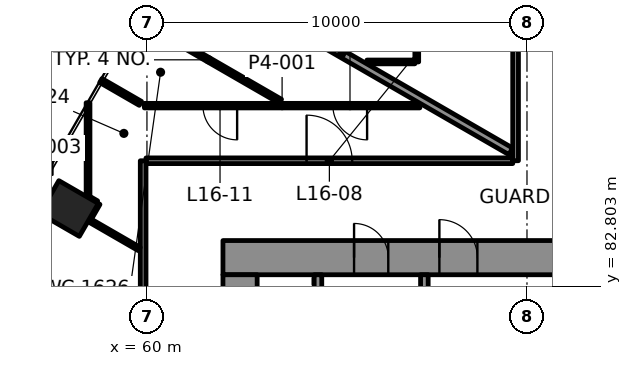
"""IFC4 building model, lengths in metres.
Left out: names, types, materials, properties, quantities, classifications, styles, units other than length and angle.
Written with IfcOpenShell. Run it as: python <this file> out.ifc"""

import sys

from ifc_helpers import new_model, si_unit, direction, frame, frame_2d, origin, origin_2d, place, context, subcontext, project, spatial, rectangle, extrude, element, fill, save


model = new_model("IFC4")
c1 = context("Model", 3, precision=1e-05, world=origin(), true_north=direction((0.0, 1.0)))
c2 = subcontext(c1, "Body", "Model", "MODEL_VIEW")
j1 = project(units=[si_unit("LENGTHUNIT", "METRE"), si_unit("PLANEANGLEUNIT", "RADIAN")], contexts=[c1])
p1 = place(None, origin())
s1 = spatial("IfcSite", under=j1, at=p1, CompositionType="ELEMENT")
p2 = place(p1, origin())
s2 = spatial("IfcBuilding", under=s1, at=p2, CompositionType="ELEMENT")
p3 = place(p2, frame((0.0, 0.0, 73.6)))
s3 = spatial("IfcBuildingStorey", under=s2, at=p3, CompositionType="ELEMENT", Elevation=73.6)
p4 = place(p3, frame((57.951, 84.843, -0.0), z_axis=(0.0, 0.0, 1.0), x_axis=(-0.5, -0.866025403784, 0.0)))
e1 = element("IfcColumn", 1, at=p4, inside=s3, PredefinedType="COLUMN", context=c2, shape_type="SweptSolid", body=[
    extrude(rectangle(XDim=1.0, YDim=1.2, at=origin_2d()), origin(), (0.0, 0.0, 1.0), 4.2),
])
p5 = place(p3, frame((62.0, 83.55, 0.0), z_axis=(0.0, 0.0, 1.0), x_axis=(1.0, 0.0, 0.0)))
e2 = element("IfcWall", 2, at=p5, inside=s3, PredefinedType="SHEAR", context=c2, shape_type="SweptSolid", body=[
    extrude(rectangle(XDim=26.0, YDim=0.9, at=frame_2d((13.0, 0.0))), origin(), (0.0, 0.0, 1.0), 4.0),
])
p6 = place(p5, frame((5.695, 0.0, 0.0)))
e3 = element("IfcOpeningElement", 3, at=p6, cuts=e2, PredefinedType="OPENING", context=c2, shape_type="SweptSolid", body=[
    extrude(rectangle(XDim=1.0, YDim=2.1, at=frame_2d((0.5, 1.05))), frame((0.0, 0.46, 0.0), z_axis=(0.0, -1.0, 0.0), x_axis=(1.0, 0.0, 0.0)), (0.0, 0.0, 1.0), 0.92),
])
p7 = place(p5, frame((19.505, 0.0, 0.0)))
e4 = element("IfcOpeningElement", 4, at=p7, cuts=e2, PredefinedType="OPENING", context=c2, shape_type="SweptSolid", body=[
    extrude(rectangle(XDim=1.0, YDim=2.1, at=frame_2d((0.5, 1.05))), frame((0.0, 0.46, 0.0), z_axis=(0.0, -1.0, 0.0), x_axis=(1.0, 0.0, 0.0)), (0.0, 0.0, 1.0), 0.92),
])
p8 = place(p5, frame((3.45, 0.0, 0.0)))
e5 = element("IfcOpeningElement", 5, at=p8, cuts=e2, PredefinedType="OPENING", context=c2, shape_type="SweptSolid", body=[
    extrude(rectangle(XDim=0.9, YDim=2.1, at=frame_2d((0.45, 1.05))), frame((0.0, 0.46, 0.0), z_axis=(0.0, -1.0, 0.0), x_axis=(1.0, 0.0, 0.0)), (0.0, 0.0, 1.0), 0.92),
])
p9 = place(p5, frame((12.65, 0.0, 0.0)))
e6 = element("IfcOpeningElement", 6, at=p9, cuts=e2, PredefinedType="OPENING", context=c2, shape_type="SweptSolid", body=[
    extrude(rectangle(XDim=0.9, YDim=2.1, at=frame_2d((0.45, 1.05))), frame((0.0, 0.46, 0.0), z_axis=(0.0, -1.0, 0.0), x_axis=(1.0, 0.0, 0.0)), (0.0, 0.0, 1.0), 0.92),
])
p10 = place(p5, frame((22.55, 0.0, 0.0)))
e7 = element("IfcOpeningElement", 7, at=p10, cuts=e2, PredefinedType="OPENING", context=c2, shape_type="SweptSolid", body=[
    extrude(rectangle(XDim=0.9, YDim=2.1, at=frame_2d((0.45, 1.05))), frame((0.0, 0.46, 0.0), z_axis=(0.0, -1.0, 0.0), x_axis=(1.0, 0.0, 0.0)), (0.0, 0.0, 1.0), 0.92),
])
p11 = place(p3, frame((62.45, 66.9, 0.0), z_axis=(0.0, 0.0, 1.0), x_axis=(0.0, 1.0, 0.0)))
e8 = element("IfcWall", 8, at=p11, inside=s3, PredefinedType="SHEAR", context=c2, shape_type="SweptSolid", body=[
    extrude(rectangle(XDim=16.2, YDim=0.9, at=frame_2d((8.1, 0.0))), origin(), (0.0, 0.0, 1.0), 4.0),
])
p12 = place(p11, frame((5.5, 0.0, 0.0)))
e9 = element("IfcOpeningElement", 9, at=p12, cuts=e8, PredefinedType="OPENING", context=c2, shape_type="SweptSolid", body=[
    extrude(rectangle(XDim=1.8, YDim=2.1, at=frame_2d((0.9, 1.05))), frame((0.0, 0.46, 0.0), z_axis=(0.0, -1.0, 0.0), x_axis=(1.0, 0.0, 0.0)), (0.0, 0.0, 1.0), 0.92),
])
p13 = place(p3, frame((59.976, 86.1, 0.0), z_axis=(0.0, 0.0, 1.0), x_axis=(1.0, 0.0, 0.0)))
e10 = element("IfcWall", 10, at=p13, inside=s3, PredefinedType="PARTITIONING", context=c2, shape_type="SweptSolid", body=[
    extrude(rectangle(XDim=9.649, YDim=0.15, at=frame_2d((4.825, 0.0))), origin(), (0.0, 0.0, 1.0), 3.4),
])
p14 = place(p13, frame((4.225, 0.0, 0.0)))
e11 = element("IfcOpeningElement", 11, at=p14, cuts=e10, PredefinedType="OPENING", context=c2, shape_type="SweptSolid", body=[
    extrude(rectangle(XDim=1.2, YDim=2.1, at=frame_2d((0.6, 1.05))), frame((0.0, 0.085, 0.0), z_axis=(0.0, -1.0, 0.0), x_axis=(1.0, 0.0, 0.0)), (0.0, 0.0, 1.0), 0.17),
])
p15 = place(p3, frame((67.181, 87.55, 0.0), z_axis=(0.0, 0.0, 1.0), x_axis=(-1.0, 0.0, 0.0)))
e12 = element("IfcWall", 12, at=p15, inside=s3, PredefinedType="PARTITIONING", context=c2, shape_type="SweptSolid", body=[
    extrude(rectangle(XDim=7.249, YDim=0.12, at=frame_2d((3.625, 0.0))), origin(), (0.0, 0.0, 1.0), 3.4),
])
p16 = place(p15, frame((1.388, 0.0, 0.0)))
e13 = element("IfcOpeningElement", 13, at=p16, cuts=e12, PredefinedType="OPENING", context=c2, shape_type="SweptSolid", body=[
    extrude(rectangle(XDim=0.9, YDim=2.1, at=frame_2d((0.45, 1.05))), frame((0.0, 0.07, 0.0), z_axis=(0.0, -1.0, 0.0), x_axis=(1.0, 0.0, 0.0)), (0.0, 0.0, 1.0), 0.14),
])
p17 = place(p15, frame((4.807, 0.0, 0.0)))
e14 = element("IfcOpeningElement", 14, at=p17, cuts=e12, PredefinedType="OPENING", context=c2, shape_type="SweptSolid", body=[
    extrude(rectangle(XDim=0.9, YDim=2.1, at=frame_2d((0.45, 1.05))), frame((0.0, 0.07, 0.0), z_axis=(0.0, -1.0, 0.0), x_axis=(1.0, 0.0, 0.0)), (0.0, 0.0, 1.0), 0.14),
])
p18 = place(p3, frame((65.789, 88.7, 0.0), z_axis=(0.0, 0.0, 1.0), x_axis=(1.0, 0.0, 0.0)))
e15 = element("IfcWall", 15, at=p18, inside=s3, PredefinedType="PARTITIONING", context=c2, shape_type="SweptSolid", body=[
    extrude(rectangle(XDim=1.261, YDim=0.1, at=frame_2d((0.631, 0.0))), origin(), (0.0, 0.0, 1.0), 3.4),
])
p19 = place(p3, frame((58.496, 84.587, 0.0), z_axis=(0.0, 0.0, 1.0), x_axis=(0.500114568548, 0.865959247497, 0.0)))
e16 = element("IfcWall", 16, at=p19, inside=s3, PredefinedType="PARTITIONING", context=c2, shape_type="SweptSolid", body=[
    extrude(rectangle(XDim=0.449, YDim=0.1, at=frame_2d((0.225, 0.0))), origin(), (0.0, 0.0, 1.0), 3.4),
])
p20 = place(p3, frame((69.7, 86.1, 0.0), z_axis=(0.0, 0.0, 1.0), x_axis=(0.0, 1.0, 0.0)))
e17 = element("IfcWall", 17, at=p20, inside=s3, PredefinedType="PARTITIONING", context=c2, shape_type="SweptSolid", body=[
    extrude(rectangle(XDim=10.6, YDim=0.15, at=frame_2d((5.3, 0.0))), origin(), (0.0, 0.0, 1.0), 3.4),
])
p21 = place(p3, frame((67.1, 99.3, 0.0), z_axis=(0.0, 0.0, 1.0), x_axis=(0.0, -1.0, 0.0)))
e18 = element("IfcWall", 18, at=p21, inside=s3, PredefinedType="PARTITIONING", context=c2, shape_type="SweptSolid", body=[
    extrude(rectangle(XDim=10.6, YDim=0.1, at=frame_2d((5.3, 0.0))), origin(), (0.0, 0.0, 1.0), 3.4),
])
p22 = place(p21, frame((7.088, 0.0, 0.0)))
e19 = element("IfcOpeningElement", 19, at=p22, cuts=e18, PredefinedType="OPENING", context=c2, shape_type="SweptSolid", body=[
    extrude(rectangle(XDim=0.9, YDim=2.1, at=frame_2d((0.45, 1.05))), frame((0.0, 0.06, 0.0), z_axis=(0.0, -1.0, 0.0), x_axis=(1.0, 0.0, 0.0)), (0.0, 0.0, 1.0), 0.12),
])
p23 = place(p3, frame((59.9, 67.321, 0.0), z_axis=(0.0, 0.0, 1.0), x_axis=(0.0, 1.0, 0.0)))
e20 = element("IfcWall", 20, at=p23, inside=s3, PredefinedType="PARTITIONING", context=c2, shape_type="SweptSolid", body=[
    extrude(rectangle(XDim=18.778, YDim=0.15, at=frame_2d((9.389, 0.0))), origin(), (0.0, 0.0, 1.0), 3.4),
])
p24 = place(p3, frame((58.45, 85.133, 0.0), z_axis=(0.0, 0.0, 1.0), x_axis=(0.0, 1.0, 0.0)))
e21 = element("IfcWall", 21, at=p24, inside=s3, PredefinedType="PARTITIONING", context=c2, shape_type="SweptSolid", body=[
    extrude(rectangle(XDim=2.494, YDim=0.1, at=frame_2d((1.247, 0.0))), origin(), (0.0, 0.0, 1.0), 3.165),
])
p25 = place(p3, frame((69.573, 86.348, 0.0), z_axis=(0.0, 0.0, 1.0), x_axis=(-0.866024495625, 0.500001572974, 0.0)))
e22 = element("IfcWall", 22, at=p25, inside=s3, PredefinedType="PARTITIONING", context=c2, shape_type="SweptSolid", body=[
    extrude(rectangle(XDim=10.272, YDim=0.2, at=frame_2d((5.136, 0.0))), origin(), (0.0, 0.0, 1.0), 3.165),
])
p26 = place(p3, frame((63.512, 87.665, 0.0), z_axis=(0.0, 0.0, 1.0), x_axis=(-0.866014185868, 0.500019429497, 0.0)))
e23 = element("IfcWall", 23, at=p26, inside=s3, PredefinedType="PARTITIONING", context=c2, shape_type="SweptSolid", body=[
    extrude(rectangle(XDim=4.365, YDim=0.12, at=frame_2d((2.182, 0.0))), origin(), (0.0, 0.0, 1.0), 3.165),
])
p27 = place(p3, frame((59.828, 87.61, 0.0), z_axis=(0.0, 0.0, 1.0), x_axis=(-0.865996090227, 0.500050769134, 0.0)))
e24 = element("IfcWall", 24, at=p27, inside=s3, PredefinedType="PARTITIONING", context=c2, shape_type="SweptSolid", body=[
    extrude(rectangle(XDim=1.202, YDim=0.12, at=frame_2d((0.601, 0.0))), origin(), (0.0, 0.0, 1.0), 3.165),
])
p28 = place(p3, frame((58.677, 85.001, 0.0), z_axis=(0.0, 0.0, 1.0), x_axis=(-0.86610613113, 0.49986015006, 0.0)))
e25 = element("IfcWall", 25, at=p28, inside=s3, PredefinedType="PARTITIONING", context=c2, shape_type="SweptSolid", body=[
    extrude(rectangle(XDim=0.205, YDim=0.1, at=frame_2d((0.102, 0.0))), origin(), (0.0, 0.0, 1.0), 3.4),
])
p29 = place(p3, frame((59.799, 83.776, 0.0), z_axis=(0.0, 0.0, 1.0), x_axis=(-0.866029087811, 0.499993619025, 0.0)))
e26 = element("IfcWall", 26, at=p29, inside=s3, PredefinedType="PARTITIONING", context=c2, shape_type="SweptSolid", body=[
    extrude(rectangle(XDim=1.533, YDim=0.1, at=frame_2d((0.766, 0.0))), origin(), (0.0, 0.0, 1.0), 3.4),
])
p30 = place(p3, frame((64.5, 77.9, 0.0), z_axis=(0.0, 0.0, 1.0), x_axis=(0.0, 1.0, 0.0)))
e27 = element("IfcWall", 27, at=p30, inside=s3, PredefinedType="PARTITIONING", context=c2, shape_type="SweptSolid", body=[
    extrude(rectangle(XDim=5.2, YDim=0.2, at=frame_2d((2.6, 0.0))), origin(), (0.0, 0.0, 1.0), 4.0),
])
p31 = place(p3, frame((67.3, 81.28, 0.0), z_axis=(0.0, 0.0, 1.0), x_axis=(0.0, 1.0, 0.0)))
e28 = element("IfcWall", 28, at=p31, inside=s3, PredefinedType="PARTITIONING", context=c2, shape_type="SweptSolid", body=[
    extrude(rectangle(XDim=1.82, YDim=0.2, at=frame_2d((0.91, 0.0))), origin(), (0.0, 0.0, 1.0), 4.0),
])
p32 = place(p14, origin())
e29 = element("IfcDoor", 29, at=p32, inside=s3, OperationType="DOUBLE_DOOR_SINGLE_SWING", PredefinedType="DOOR", context=c2, shape_type="SweptSolid", body=[
    extrude(rectangle(XDim=1.2, YDim=2.1, at=frame_2d((0.6, 1.05))), frame((0.0, 0.025, 0.0), z_axis=(0.0, -1.0, 0.0), x_axis=(1.0, 0.0, 0.0)), (0.0, 0.0, 1.0), 0.05),
])
fill(e11, e29)
p33 = place(p16, origin())
e30 = element("IfcDoor", 30, at=p33, inside=s3, OperationType="SINGLE_SWING_LEFT", PredefinedType="DOOR", context=c2, shape_type="SweptSolid", body=[
    extrude(rectangle(XDim=0.9, YDim=2.1, at=frame_2d((0.45, 1.05))), frame((0.0, 0.025, 0.0), z_axis=(0.0, -1.0, 0.0), x_axis=(1.0, 0.0, 0.0)), (0.0, 0.0, 1.0), 0.05),
])
fill(e13, e30)
p34 = place(p17, origin())
e31 = element("IfcDoor", 31, at=p34, inside=s3, OperationType="SINGLE_SWING_RIGHT", PredefinedType="DOOR", context=c2, shape_type="SweptSolid", body=[
    extrude(rectangle(XDim=0.9, YDim=2.1, at=frame_2d((0.45, 1.05))), frame((0.0, 0.025, 0.0), z_axis=(0.0, -1.0, 0.0), x_axis=(1.0, 0.0, 0.0)), (0.0, 0.0, 1.0), 0.05),
])
fill(e14, e31)
p35 = place(p6, origin())
e32 = element("IfcDoor", 32, at=p35, inside=s3, OperationType="SINGLE_SWING_LEFT", PredefinedType="DOOR", context=c2, shape_type="SweptSolid", body=[
    extrude(rectangle(XDim=1.0, YDim=2.1, at=frame_2d((0.5, 1.05))), frame((0.0, 0.17, 0.0), z_axis=(0.0, -1.0, 0.0), x_axis=(1.0, 0.0, 0.0)), (0.0, 0.0, 1.0), 0.34),
])
fill(e3, e32)
p36 = place(p8, origin())
e33 = element("IfcDoor", 33, at=p36, inside=s3, OperationType="SINGLE_SWING_RIGHT", PredefinedType="DOOR", context=c2, shape_type="SweptSolid", body=[
    extrude(rectangle(XDim=0.9, YDim=2.1, at=frame_2d((0.45, 1.05))), frame((0.0, 0.17, 0.0), z_axis=(0.0, -1.0, 0.0), x_axis=(1.0, 0.0, 0.0)), (0.0, 0.0, 1.0), 0.34),
])
fill(e5, e33)
save(model, sys.argv[1])
